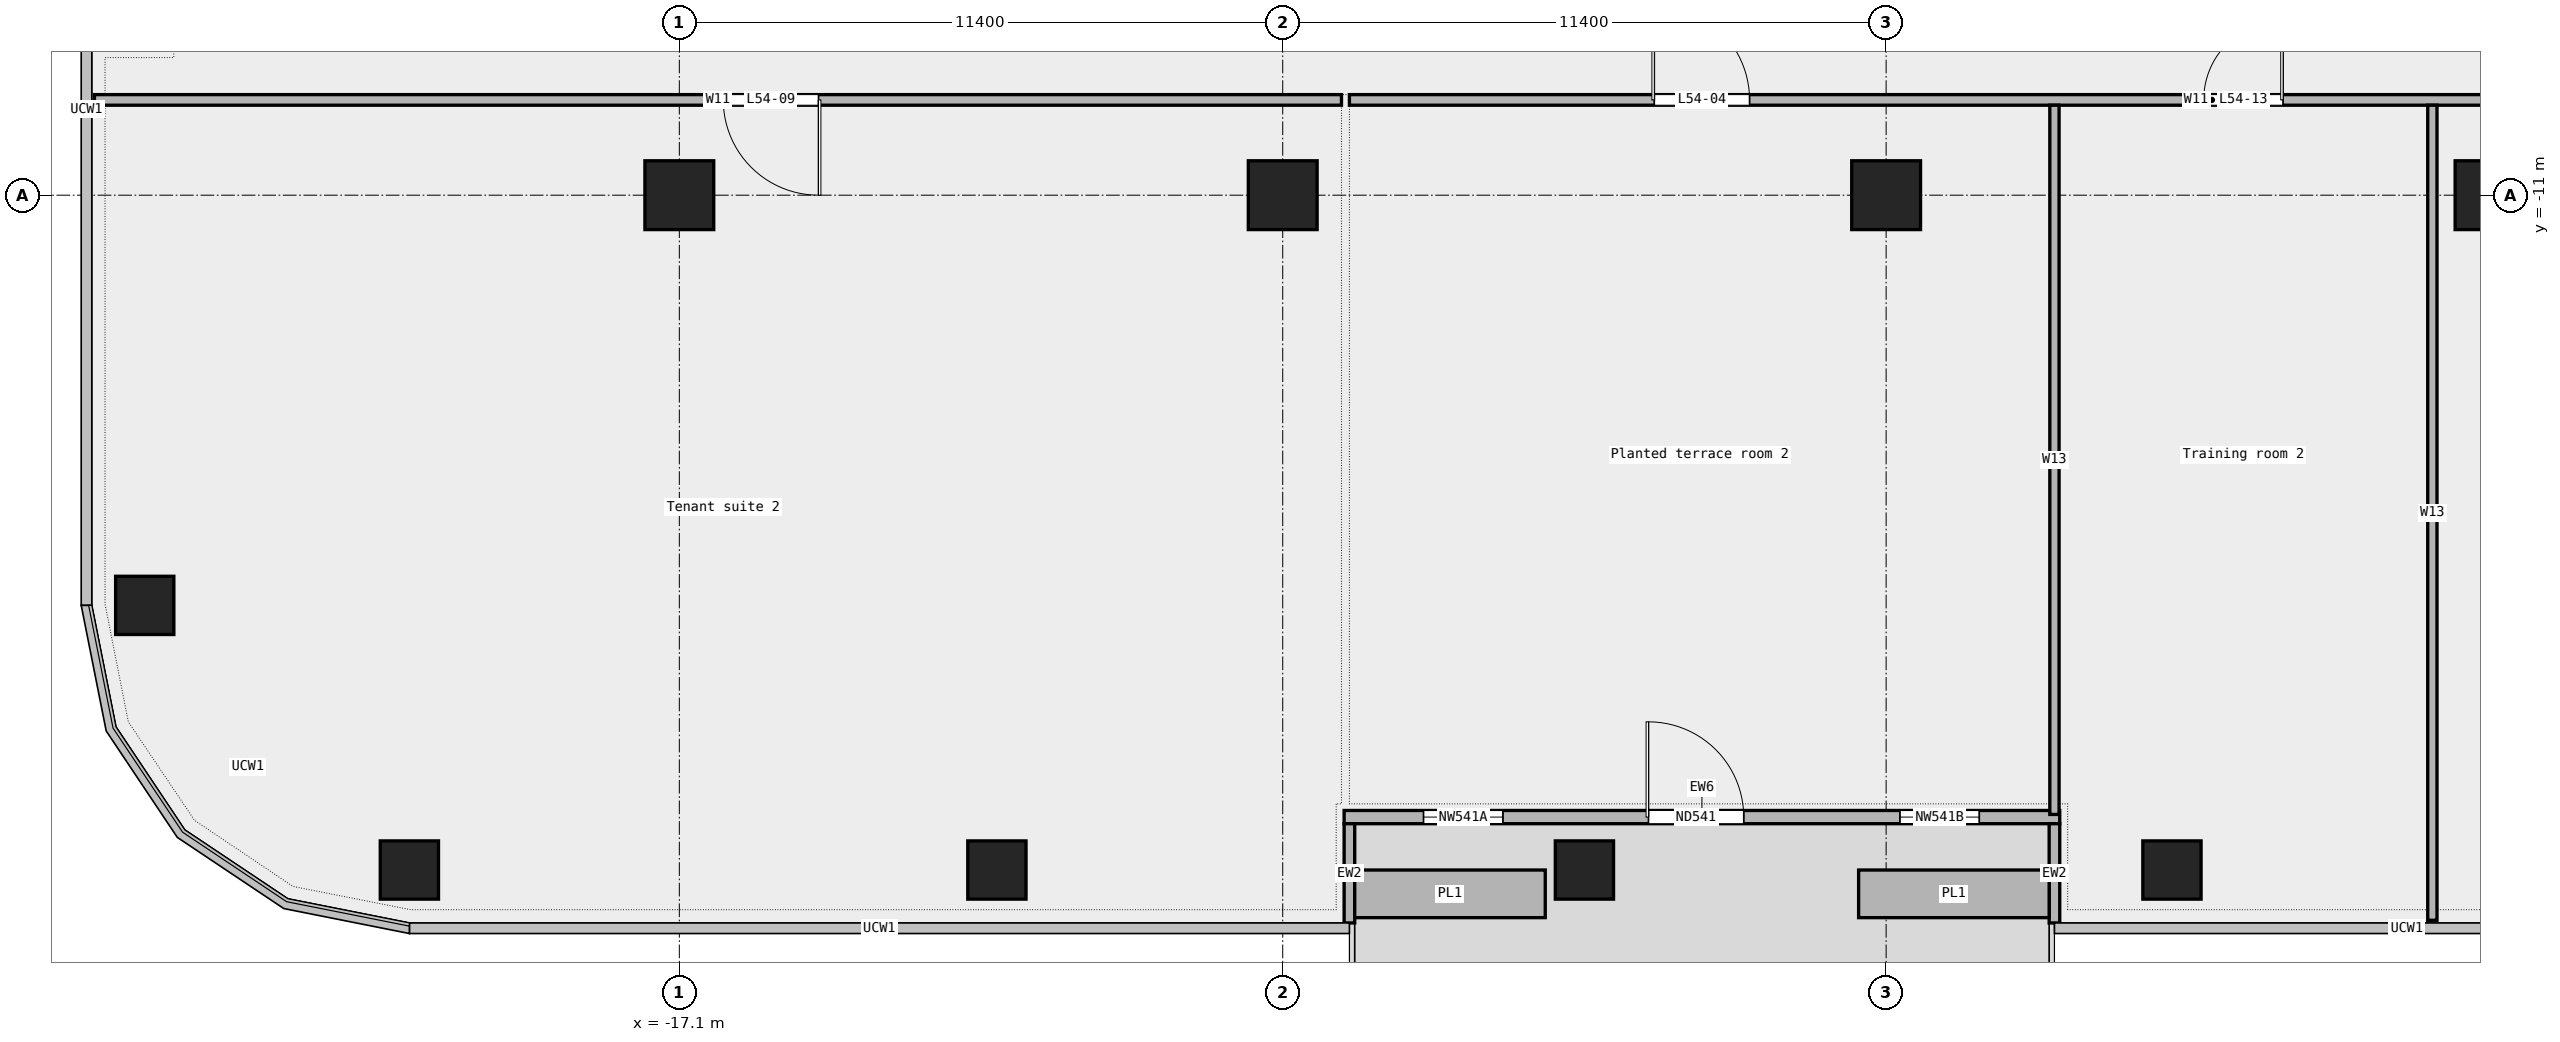
"""IFC4 building model, lengths in metres.
Left out: names, types, materials, properties, quantities, classifications, styles, units other than length and angle.
Written with IfcOpenShell. Run it as: python <this file> out.ifc"""

import sys

from ifc_helpers import new_model, si_unit, direction, frame, frame_2d, origin, origin_2d, place, context, subcontext, project, spatial, rectangle, extrude, element, fill, save


model = new_model("IFC4")
c1 = context("Model", 3, precision=1e-05, world=origin(), true_north=direction((0.0, 1.0)))
c2 = subcontext(c1, "Body", "Model", "MODEL_VIEW")
j1 = project(units=[si_unit("LENGTHUNIT", "METRE"), si_unit("PLANEANGLEUNIT", "RADIAN")], contexts=[c1])
p1 = place(None, origin())
s1 = spatial("IfcSite", under=j1, at=p1, CompositionType="ELEMENT")
p2 = place(p1, origin())
s2 = spatial("IfcBuilding", under=s1, at=p2, CompositionType="ELEMENT")
p3 = place(p2, frame((0.0, 0.0, 251.0)))
s3 = spatial("IfcBuildingStorey", under=s2, at=p3, CompositionType="ELEMENT", Elevation=251.0)
for number, where, z_axis, x_axis in (
    (1, (-22.2, -23.75, 0.0), (0.0, 0.0, 1.0), (1.0, 0.0, 0.0)),
    (2, (-11.1, -23.75, 0.0), (0.0, 0.0, 1.0), (1.0, 0.0, 0.0)),
    (3, (0.0, -23.75, 0.0), (0.0, 0.0, 1.0), (1.0, 0.0, 0.0)),
    (4, (11.1, -23.75, 0.0), (0.0, 0.0, 1.0), (1.0, 0.0, 0.0)),
    (5, (-27.2, -18.75, 0.0), (0.0, 0.0, 1.0), (1.0, 0.0, 0.0)),
):
    element("IfcColumn", number, at=place(p3, frame(where, z_axis=z_axis, x_axis=x_axis)), inside=s3, PredefinedType="COLUMN", context=c2, shape_type="SweptSolid", body=[
        extrude(rectangle(XDim=1.1, YDim=1.1, at=origin_2d()), origin(), (0.0, 0.0, 1.0), 3.6),
    ])
for number, where, z_axis, x_axis in (
    (6, (-17.1, -11.0, 0.0), (0.0, 0.0, 1.0), (1.0, 0.0, 0.0)),
    (7, (-5.7, -11.0, 0.0), (0.0, 0.0, 1.0), (1.0, 0.0, 0.0)),
    (8, (5.7, -11.0, 0.0), (0.0, 0.0, 1.0), (1.0, 0.0, 0.0)),
    (9, (17.1, -11.0, 0.0), (0.0, 0.0, 1.0), (1.0, 0.0, 0.0)),
):
    element("IfcColumn", number, at=place(p3, frame(where, z_axis=z_axis, x_axis=x_axis)), inside=s3, PredefinedType="COLUMN", context=c2, shape_type="SweptSolid", body=[
        extrude(rectangle(XDim=1.3, YDim=1.3, at=origin_2d()), origin(), (0.0, 0.0, 1.0), 3.6),
    ])
p4 = place(p3, frame((-4.54, -22.75, 0.0), z_axis=(0.0, 0.0, 1.0), x_axis=(1.0, 0.0, 0.0)))
e10 = element("IfcWall", 10, at=p4, inside=s3, PredefinedType="STANDARD", context=c2, shape_type="SweptSolid", body=[
    extrude(rectangle(XDim=13.52, YDim=0.25, at=frame_2d((6.76, 0.0))), origin(), (0.0, 0.0, 1.0), 3.6),
])
p5 = place(p4, frame((1.5, 0.0, 0.45)))
e11 = element("IfcOpeningElement", 11, at=p5, cuts=e10, PredefinedType="OPENING", context=c2, shape_type="SweptSolid", body=[
    extrude(rectangle(XDim=1.5, YDim=2.4, at=frame_2d((0.75, 1.2))), frame((0.0, 0.137, 0.0), z_axis=(0.0, -1.0, 0.0), x_axis=(1.0, 0.0, 0.0)), (0.0, 0.0, 1.0), 0.274),
])
p6 = place(p4, frame((5.75, 0.0, 0.0)))
e12 = element("IfcOpeningElement", 12, at=p6, cuts=e10, PredefinedType="OPENING", context=c2, shape_type="SweptSolid", body=[
    extrude(rectangle(XDim=1.8, YDim=2.4, at=frame_2d((0.9, 1.2))), frame((0.0, 0.137, 0.0), z_axis=(0.0, -1.0, 0.0), x_axis=(1.0, 0.0, 0.0)), (0.0, 0.0, 1.0), 0.274),
])
p7 = place(p4, frame((10.5, 0.0, 0.45)))
e13 = element("IfcOpeningElement", 13, at=p7, cuts=e10, PredefinedType="OPENING", context=c2, shape_type="SweptSolid", body=[
    extrude(rectangle(XDim=1.5, YDim=2.4, at=frame_2d((0.75, 1.2))), frame((0.0, 0.137, 0.0), z_axis=(0.0, -1.0, 0.0), x_axis=(1.0, 0.0, 0.0)), (0.0, 0.0, 1.0), 0.274),
])
for number, where, z_axis, x_axis in (
    (14, (-4.44, -24.75, 0.0), (0.0, 0.0, 1.0), (0.0, 1.0, 0.0)),
    (15, (8.88, -24.75, 0.0), (0.0, 0.0, 1.0), (0.0, 1.0, 0.0)),
):
    element("IfcWall", number, at=place(p3, frame(where, z_axis=z_axis, x_axis=x_axis)), inside=s3, PredefinedType="STANDARD", context=c2, shape_type="SweptSolid", body=[
        extrude(rectangle(XDim=1.875, YDim=0.2, at=frame_2d((0.938, 0.0))), origin(), (0.0, 0.0, 1.0), 3.6),
    ])
for number, where, z_axis, x_axis in (
    (16, (-4.34, -24.2, 0.0), (0.0, 0.0, 1.0), (1.0, 0.0, 0.0)),
    (17, (5.18, -24.2, 0.0), (0.0, 0.0, 1.0), (1.0, 0.0, 0.0)),
):
    element("IfcWall", number, at=place(p3, frame(where, z_axis=z_axis, x_axis=x_axis)), inside=s3, PredefinedType="STANDARD", context=c2, shape_type="SweptSolid", body=[
        extrude(rectangle(XDim=3.6, YDim=0.9, at=frame_2d((1.8, 0.0))), origin(), (0.0, 0.0, 1.0), 0.7),
    ])
p8 = place(p3, frame((-28.15, -9.2, 0.0), z_axis=(0.0, 0.0, 1.0), x_axis=(1.0, 0.0, 0.0)))
e18 = element("IfcWall", 18, at=p8, inside=s3, PredefinedType="PARTITIONING", context=c2, shape_type="SweptSolid", body=[
    extrude(rectangle(XDim=23.56, YDim=0.2, at=frame_2d((11.78, 0.0))), origin(), (0.0, 0.0, 1.0), 3.6),
])
p9 = place(p8, frame((11.88, 0.0, 0.0)))
e19 = element("IfcOpeningElement", 19, at=p9, cuts=e18, PredefinedType="OPENING", context=c2, shape_type="SweptSolid", body=[
    extrude(rectangle(XDim=1.8, YDim=2.1, at=frame_2d((0.9, 1.05))), frame((0.0, 0.112, 0.0), z_axis=(0.0, -1.0, 0.0), x_axis=(1.0, 0.0, 0.0)), (0.0, 0.0, 1.0), 0.224),
])
p10 = place(p3, frame((-4.44, -9.2, 0.0), z_axis=(0.0, 0.0, 1.0), x_axis=(1.0, 0.0, 0.0)))
e20 = element("IfcWall", 20, at=p10, inside=s3, PredefinedType="PARTITIONING", context=c2, shape_type="SweptSolid", body=[
    extrude(rectangle(XDim=32.59, YDim=0.2, at=frame_2d((16.295, 0.0))), origin(), (0.0, 0.0, 1.0), 3.6),
])
p11 = place(p10, frame((25.525, 0.0, 0.0)))
e21 = element("IfcOpeningElement", 21, at=p11, cuts=e20, PredefinedType="OPENING", context=c2, shape_type="SweptSolid", body=[
    extrude(rectangle(XDim=1.8, YDim=2.1, at=frame_2d((0.9, 1.05))), frame((0.0, 0.112, 0.0), z_axis=(0.0, -1.0, 0.0), x_axis=(1.0, 0.0, 0.0)), (0.0, 0.0, 1.0), 0.224),
])
p12 = place(p10, frame((5.76, 0.0, 0.0)))
e22 = element("IfcOpeningElement", 22, at=p12, cuts=e20, PredefinedType="OPENING", context=c2, shape_type="SweptSolid", body=[
    extrude(rectangle(XDim=1.8, YDim=2.1, at=frame_2d((0.9, 1.05))), frame((0.0, 0.112, 0.0), z_axis=(0.0, -1.0, 0.0), x_axis=(1.0, 0.0, 0.0)), (0.0, 0.0, 1.0), 0.224),
])
p13 = place(p10, frame((16.14, 0.0, 0.0)))
e23 = element("IfcOpeningElement", 23, at=p13, cuts=e20, PredefinedType="OPENING", context=c2, shape_type="SweptSolid", body=[
    extrude(rectangle(XDim=1.5, YDim=2.1, at=frame_2d((0.75, 1.05))), frame((0.0, 0.112, 0.0), z_axis=(0.0, -1.0, 0.0), x_axis=(1.0, 0.0, 0.0)), (0.0, 0.0, 1.0), 0.224),
])
p14 = place(p3, frame((8.88, -22.7, 0.0), z_axis=(0.0, 0.0, 1.0), x_axis=(0.0, 1.0, 0.0)))
e24 = element("IfcWall", 24, at=p14, inside=s3, PredefinedType="PARTITIONING", context=c2, shape_type="SweptSolid", body=[
    extrude(rectangle(XDim=13.4, YDim=0.175, at=frame_2d((6.7, 0.0))), origin(), (0.0, 0.0, 1.0), 3.6),
])
p15 = place(p3, frame((16.02, -24.7, 0.0), z_axis=(0.0, 0.0, 1.0), x_axis=(0.0, 1.0, 0.0)))
e25 = element("IfcWall", 25, at=p15, inside=s3, PredefinedType="PARTITIONING", context=c2, shape_type="SweptSolid", body=[
    extrude(rectangle(XDim=15.4, YDim=0.175, at=frame_2d((7.7, 0.0))), origin(), (0.0, 0.0, 1.0), 3.6),
])
p16 = place(p5, origin())
e26 = element("IfcWindow", 26, at=p16, inside=s3, PartitioningType="SINGLE_PANEL", PredefinedType="WINDOW", context=c2, shape_type="SweptSolid", body=[
    extrude(rectangle(XDim=1.5, YDim=2.4, at=frame_2d((0.75, 1.2))), frame((0.0, 0.03, 0.0), z_axis=(0.0, -1.0, 0.0), x_axis=(1.0, 0.0, 0.0)), (0.0, 0.0, 1.0), 0.06),
])
fill(e11, e26)
p17 = place(p6, origin())
e27 = element("IfcDoor", 27, at=p17, inside=s3, OperationType="DOUBLE_DOOR_SINGLE_SWING", PredefinedType="DOOR", context=c2, shape_type="SweptSolid", body=[
    extrude(rectangle(XDim=1.8, YDim=2.4, at=frame_2d((0.9, 1.2))), frame((0.0, 0.025, 0.0), z_axis=(0.0, -1.0, 0.0), x_axis=(1.0, 0.0, 0.0)), (0.0, 0.0, 1.0), 0.05),
])
fill(e12, e27)
p18 = place(p7, origin())
e28 = element("IfcWindow", 28, at=p18, inside=s3, PartitioningType="SINGLE_PANEL", PredefinedType="WINDOW", context=c2, shape_type="SweptSolid", body=[
    extrude(rectangle(XDim=1.5, YDim=2.4, at=frame_2d((0.75, 1.2))), frame((0.0, 0.03, 0.0), z_axis=(0.0, -1.0, 0.0), x_axis=(1.0, 0.0, 0.0)), (0.0, 0.0, 1.0), 0.06),
])
fill(e13, e28)
p19 = place(p12, origin())
e29 = element("IfcDoor", 29, at=p19, inside=s3, OperationType="DOUBLE_DOOR_SINGLE_SWING", PredefinedType="DOOR", context=c2, shape_type="SweptSolid", body=[
    extrude(rectangle(XDim=1.8, YDim=2.1, at=frame_2d((0.9, 1.05))), frame((0.0, 0.025, 0.0), z_axis=(0.0, -1.0, 0.0), x_axis=(1.0, 0.0, 0.0)), (0.0, 0.0, 1.0), 0.05),
])
fill(e22, e29)
p20 = place(p9, origin())
e30 = element("IfcDoor", 30, at=p20, inside=s3, OperationType="DOUBLE_DOOR_SINGLE_SWING", PredefinedType="DOOR", context=c2, shape_type="SweptSolid", body=[
    extrude(rectangle(XDim=1.8, YDim=2.1, at=frame_2d((0.9, 1.05))), frame((0.0, 0.025, 0.0), z_axis=(0.0, -1.0, 0.0), x_axis=(1.0, 0.0, 0.0)), (0.0, 0.0, 1.0), 0.05),
])
fill(e19, e30)
p21 = place(p13, origin())
e31 = element("IfcDoor", 31, at=p21, inside=s3, OperationType="DOUBLE_DOOR_SINGLE_SWING", PredefinedType="DOOR", context=c2, shape_type="SweptSolid", body=[
    extrude(rectangle(XDim=1.5, YDim=2.1, at=frame_2d((0.75, 1.05))), frame((0.0, 0.025, 0.0), z_axis=(0.0, -1.0, 0.0), x_axis=(1.0, 0.0, 0.0)), (0.0, 0.0, 1.0), 0.05),
])
fill(e23, e31)
save(model, sys.argv[1])
